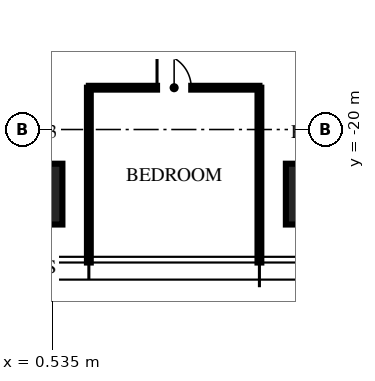
"""IFC4 building model, lengths in metres.
Left out: names, types, materials, properties, quantities, classifications, styles, units other than length and angle.
Written with IfcOpenShell. Run it as: python <this file> out.ifc"""

import sys

from ifc_helpers import new_model, si_unit, direction, frame, frame_2d, origin, origin_2d, place, context, subcontext, project, spatial, rectangle, extrude, element, fill, save


model = new_model("IFC4")
c1 = context("Model", 3, precision=1e-05, world=origin(), true_north=direction((0.0, 1.0)))
c2 = subcontext(c1, "Body", "Model", "MODEL_VIEW")
j1 = project(units=[si_unit("LENGTHUNIT", "METRE"), si_unit("PLANEANGLEUNIT", "RADIAN")], contexts=[c1])
p1 = place(None, origin())
s1 = spatial("IfcSite", under=j1, at=p1, CompositionType="ELEMENT")
p2 = place(p1, origin())
s2 = spatial("IfcBuilding", under=s1, at=p2, CompositionType="ELEMENT")
p3 = place(p2, frame((0.0, 0.0, 308.25)))
s3 = spatial("IfcBuildingStorey", under=s2, at=p3, CompositionType="ELEMENT", Elevation=308.25)
for number, where, z_axis, x_axis in (
    (1, (7.48, -21.7, 0.0), (0.0, 0.0, 1.0), (1.0, 0.0, 0.0)),
    (2, (0.0, -21.7, 0.0), (0.0, 0.0, 1.0), (1.0, 0.0, 0.0)),
):
    element("IfcColumn", number, at=place(p3, frame(where, z_axis=z_axis, x_axis=x_axis)), inside=s3, PredefinedType="COLUMN", context=c2, shape_type="SweptSolid", body=[
        extrude(rectangle(XDim=1.6, YDim=1.6, at=origin_2d()), origin(), (0.0, 0.0, 1.0), 3.75),
    ])
for number, where, z_axis, x_axis in (
    (3, (1.496, -18.9, 0.0), (0.0, 0.0, 1.0), (0.0, -1.0, 0.0)),
    (4, (5.984, -18.9, 0.0), (0.0, 0.0, 1.0), (0.0, -1.0, 0.0)),
):
    element("IfcWall", number, at=place(p3, frame(where, z_axis=z_axis, x_axis=x_axis)), inside=s3, PredefinedType="PARTITIONING", context=c2, shape_type="SweptSolid", body=[
        extrude(rectangle(XDim=4.6, YDim=0.1, at=frame_2d((2.3, 0.0))), origin(), (0.0, 0.0, 1.0), 3.01),
    ])
p4 = place(p3, frame((1.496, -18.9, 0.0), z_axis=(0.0, 0.0, 1.0), x_axis=(1.0, 0.0, 0.0)))
e5 = element("IfcWall", 5, at=p4, inside=s3, PredefinedType="PARTITIONING", context=c2, shape_type="SweptSolid", body=[
    extrude(rectangle(XDim=4.488, YDim=0.1, at=frame_2d((2.244, 0.0))), origin(), (0.0, 0.0, 1.0), 2.91),
])
p5 = place(p4, frame((1.794, 0.0, 0.0)))
e6 = element("IfcOpeningElement", 6, at=p5, cuts=e5, PredefinedType="OPENING", context=c2, shape_type="SweptSolid", body=[
    extrude(rectangle(XDim=0.9, YDim=2.1, at=frame_2d((0.45, 1.05))), frame((0.0, 0.06, 0.0), z_axis=(0.0, -1.0, 0.0), x_axis=(1.0, 0.0, 0.0)), (0.0, 0.0, 1.0), 0.12),
])
p6 = place(p5, origin())
e7 = element("IfcDoor", 7, at=p6, inside=s3, OperationType="SINGLE_SWING_LEFT", PredefinedType="DOOR", context=c2, shape_type="SweptSolid", body=[
    extrude(rectangle(XDim=0.9, YDim=2.1, at=frame_2d((0.45, 1.05))), frame((0.0, 0.025, 0.0), z_axis=(0.0, -1.0, 0.0), x_axis=(1.0, 0.0, 0.0)), (0.0, 0.0, 1.0), 0.05),
])
fill(e6, e7)
save(model, sys.argv[1])
